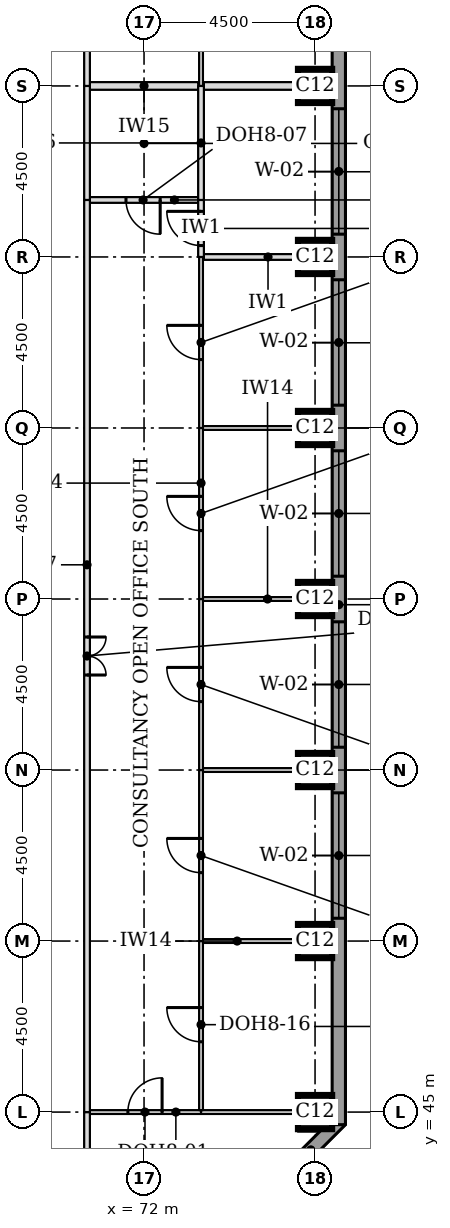
"""IFC4 building model, lengths in metres.
Left out: names, types, materials, properties, quantities, classifications, styles, units other than length and angle.
Written with IfcOpenShell. Run it as: python <this file> out.ifc"""

import sys

from ifc_helpers import new_model, si_unit, direction, frame, frame_2d, origin, origin_2d, place, context, subcontext, project, spatial, rectangle, extrude, element, fill, save


model = new_model("IFC4")
c1 = context("Model", 3, precision=1e-05, world=origin(), true_north=direction((0.0, 1.0)))
c2 = subcontext(c1, "Body", "Model", "MODEL_VIEW")
j1 = project(units=[si_unit("LENGTHUNIT", "METRE"), si_unit("PLANEANGLEUNIT", "RADIAN")], contexts=[c1])
p1 = place(None, origin())
s1 = spatial("IfcSite", under=j1, at=p1, CompositionType="ELEMENT")
p2 = place(p1, origin())
s2 = spatial("IfcBuilding", under=s1, at=p2, CompositionType="ELEMENT")
p3 = place(p2, frame((0.0, 0.0, 199.5)))
s3 = spatial("IfcBuildingStorey", under=s2, at=p3, CompositionType="ELEMENT", Elevation=199.5)
for number, where, z_axis, x_axis in (
    (1, (76.5, 45.0, 0.0), (0.0, 0.0, 1.0), (1.0, 0.0, 0.0)),
    (2, (76.5, 49.5, 0.0), (0.0, 0.0, 1.0), (1.0, 0.0, 0.0)),
    (3, (76.5, 54.0, 0.0), (0.0, 0.0, 1.0), (1.0, 0.0, 0.0)),
    (4, (76.5, 58.5, 0.0), (0.0, 0.0, 1.0), (1.0, 0.0, 0.0)),
    (5, (76.5, 63.0, 0.0), (0.0, 0.0, 1.0), (1.0, 0.0, 0.0)),
    (6, (76.5, 67.5, 0.0), (0.0, 0.0, 1.0), (1.0, 0.0, 0.0)),
    (7, (76.5, 72.0, 0.0), (0.0, 0.0, 1.0), (1.0, 0.0, 0.0)),
):
    element("IfcColumn", number, at=place(p3, frame(where, z_axis=z_axis, x_axis=x_axis)), inside=s3, PredefinedType="COLUMN", context=c2, shape_type="SweptSolid", body=[
        extrude(rectangle(XDim=0.9, YDim=0.9, at=origin_2d()), origin(), (0.0, 0.0, 1.0), 3.7),
    ])
p4 = place(p3, frame((72.208, 39.824, 0.0), z_axis=(0.0, 0.0, 1.0), x_axis=(0.707106781187, 0.707106781187, 0.0)))
e8 = element("IfcWall", 8, at=p4, inside=s3, PredefinedType="STANDARD", context=c2, shape_type="SweptSolid", body=[
    extrude(rectangle(XDim=7.027, YDim=0.35, at=frame_2d((3.513, 0.0))), origin(), (0.0, 0.0, 1.0), 3.525),
])
p5 = place(p4, frame((1.863, 0.0, 0.9)))
e9 = element("IfcOpeningElement", 9, at=p5, cuts=e8, PredefinedType="OPENING", context=c2, shape_type="SweptSolid", body=[
    extrude(rectangle(XDim=3.3, YDim=1.9, at=frame_2d((1.65, 0.95))), frame((0.0, 0.185, 0.0), z_axis=(0.0, -1.0, 0.0), x_axis=(1.0, 0.0, 0.0)), (0.0, 0.0, 1.0), 0.37),
])
p6 = place(p3, frame((77.125, 44.669, 0.0), z_axis=(0.0, 0.0, 1.0), x_axis=(0.0, 1.0, 0.0)))
e10 = element("IfcWall", 10, at=p6, inside=s3, PredefinedType="STANDARD", context=c2, shape_type="SweptSolid", body=[
    extrude(rectangle(XDim=32.163, YDim=0.35, at=frame_2d((16.081, 0.0))), origin(), (0.0, 0.0, 1.0), 3.525),
])
p7 = place(p6, frame((5.431, 0.0, 0.9)))
e11 = element("IfcOpeningElement", 11, at=p7, cuts=e10, PredefinedType="OPENING", context=c2, shape_type="SweptSolid", body=[
    extrude(rectangle(XDim=3.3, YDim=1.9, at=frame_2d((1.65, 0.95))), frame((0.0, 0.185, 0.0), z_axis=(0.0, -1.0, 0.0), x_axis=(1.0, 0.0, 0.0)), (0.0, 0.0, 1.0), 0.37),
])
p8 = place(p6, frame((9.931, 0.0, 0.9)))
e12 = element("IfcOpeningElement", 12, at=p8, cuts=e10, PredefinedType="OPENING", context=c2, shape_type="SweptSolid", body=[
    extrude(rectangle(XDim=3.3, YDim=1.9, at=frame_2d((1.65, 0.95))), frame((0.0, 0.185, 0.0), z_axis=(0.0, -1.0, 0.0), x_axis=(1.0, 0.0, 0.0)), (0.0, 0.0, 1.0), 0.37),
])
p9 = place(p6, frame((14.431, 0.0, 0.9)))
e13 = element("IfcOpeningElement", 13, at=p9, cuts=e10, PredefinedType="OPENING", context=c2, shape_type="SweptSolid", body=[
    extrude(rectangle(XDim=3.3, YDim=1.9, at=frame_2d((1.65, 0.95))), frame((0.0, 0.185, 0.0), z_axis=(0.0, -1.0, 0.0), x_axis=(1.0, 0.0, 0.0)), (0.0, 0.0, 1.0), 0.37),
])
p10 = place(p6, frame((18.931, 0.0, 0.9)))
e14 = element("IfcOpeningElement", 14, at=p10, cuts=e10, PredefinedType="OPENING", context=c2, shape_type="SweptSolid", body=[
    extrude(rectangle(XDim=3.3, YDim=1.9, at=frame_2d((1.65, 0.95))), frame((0.0, 0.185, 0.0), z_axis=(0.0, -1.0, 0.0), x_axis=(1.0, 0.0, 0.0)), (0.0, 0.0, 1.0), 0.37),
])
p11 = place(p6, frame((23.431, 0.0, 0.9)))
e15 = element("IfcOpeningElement", 15, at=p11, cuts=e10, PredefinedType="OPENING", context=c2, shape_type="SweptSolid", body=[
    extrude(rectangle(XDim=3.3, YDim=1.9, at=frame_2d((1.65, 0.95))), frame((0.0, 0.185, 0.0), z_axis=(0.0, -1.0, 0.0), x_axis=(1.0, 0.0, 0.0)), (0.0, 0.0, 1.0), 0.37),
])
p12 = place(p3, frame((70.575, 45.0, 0.0), z_axis=(0.0, 0.0, 1.0), x_axis=(1.0, 0.0, 0.0)))
e16 = element("IfcWall", 16, at=p12, inside=s3, PredefinedType="PARTITIONING", context=c2, shape_type="SweptSolid", body=[
    extrude(rectangle(XDim=2.925, YDim=0.1, at=frame_2d((1.462, 0.0))), origin(), (0.0, 0.0, 1.0), 3.096),
])
p13 = place(p12, frame((1.0, 0.0, 0.0)))
e17 = element("IfcOpeningElement", 17, at=p13, cuts=e16, PredefinedType="OPENING", context=c2, shape_type="SweptSolid", body=[
    extrude(rectangle(XDim=0.9, YDim=2.1, at=frame_2d((0.45, 1.05))), frame((0.0, 0.06, 0.0), z_axis=(0.0, -1.0, 0.0), x_axis=(1.0, 0.0, 0.0)), (0.0, 0.0, 1.0), 0.12),
])
p14 = place(p3, frame((73.5, 45.0, 0.0), z_axis=(0.0, 0.0, 1.0), x_axis=(1.0, 0.0, 0.0)))
e18 = element("IfcWall", 18, at=p14, inside=s3, PredefinedType="PARTITIONING", context=c2, shape_type="SweptSolid", body=[
    extrude(rectangle(XDim=2.55, YDim=0.1, at=frame_2d((1.275, 0.0))), origin(), (0.0, 0.0, 1.0), 3.096),
])
for number, where, z_axis, x_axis in (
    (19, (73.55, 49.5, 0.0), (0.0, 0.0, 1.0), (1.0, 0.0, 0.0)),
    (20, (73.55, 54.0, 0.0), (0.0, 0.0, 1.0), (1.0, 0.0, 0.0)),
    (21, (73.55, 58.5, 0.0), (0.0, 0.0, 1.0), (1.0, 0.0, 0.0)),
    (22, (73.55, 63.0, 0.0), (0.0, 0.0, 1.0), (1.0, 0.0, 0.0)),
):
    element("IfcWall", number, at=place(p3, frame(where, z_axis=z_axis, x_axis=x_axis)), inside=s3, PredefinedType="PARTITIONING", context=c2, shape_type="SweptSolid", body=[
        extrude(rectangle(XDim=3.4, YDim=0.1, at=frame_2d((1.7, 0.0))), origin(), (0.0, 0.0, 1.0), 3.55),
    ])
p15 = place(p3, frame((73.575, 67.5, 0.0), z_axis=(0.0, 0.0, 1.0), x_axis=(1.0, 0.0, 0.0)))
e23 = element("IfcWall", 23, at=p15, inside=s3, PredefinedType="PARTITIONING", context=c2, shape_type="SweptSolid", body=[
    extrude(rectangle(XDim=3.375, YDim=0.15, at=frame_2d((1.688, 0.0))), origin(), (0.0, 0.0, 1.0), 3.55),
])
p16 = place(p3, frame((70.575, 69.0, 0.0), z_axis=(0.0, 0.0, 1.0), x_axis=(1.0, 0.0, 0.0)))
e24 = element("IfcWall", 24, at=p16, inside=s3, PredefinedType="PARTITIONING", context=c2, shape_type="SweptSolid", body=[
    extrude(rectangle(XDim=2.85, YDim=0.15, at=frame_2d((1.425, 0.0))), origin(), (0.0, 0.0, 1.0), 3.55),
])
p17 = place(p16, frame((0.95, 0.0, 0.0)))
e25 = element("IfcOpeningElement", 25, at=p17, cuts=e24, PredefinedType="OPENING", context=c2, shape_type="SweptSolid", body=[
    extrude(rectangle(XDim=0.9, YDim=2.1, at=frame_2d((0.45, 1.05))), frame((0.0, 0.085, 0.0), z_axis=(0.0, -1.0, 0.0), x_axis=(1.0, 0.0, 0.0)), (0.0, 0.0, 1.0), 0.17),
])
p18 = place(p3, frame((70.575, 72.0, 0.0), z_axis=(0.0, 0.0, 1.0), x_axis=(1.0, 0.0, 0.0)))
e26 = element("IfcWall", 26, at=p18, inside=s3, PredefinedType="PARTITIONING", context=c2, shape_type="SweptSolid", body=[
    extrude(rectangle(XDim=2.85, YDim=0.2, at=frame_2d((1.425, 0.0))), origin(), (0.0, 0.0, 1.0), 3.55),
])
p19 = place(p3, frame((73.575, 72.0, 0.0), z_axis=(0.0, 0.0, 1.0), x_axis=(1.0, 0.0, 0.0)))
e27 = element("IfcWall", 27, at=p19, inside=s3, PredefinedType="PARTITIONING", context=c2, shape_type="SweptSolid", body=[
    extrude(rectangle(XDim=3.375, YDim=0.2, at=frame_2d((1.688, 0.0))), origin(), (0.0, 0.0, 1.0), 3.55),
])
p20 = place(p3, frame((70.5, 40.05, 0.0), z_axis=(0.0, 0.0, 1.0), x_axis=(0.0, 1.0, 0.0)))
e28 = element("IfcWall", 28, at=p20, inside=s3, PredefinedType="PARTITIONING", context=c2, shape_type="SweptSolid", body=[
    extrude(rectangle(XDim=4.95, YDim=0.15, at=frame_2d((2.475, 0.0))), origin(), (0.0, 0.0, 1.0), 3.55),
])
p21 = place(p3, frame((70.5, 45.0, 0.0), z_axis=(0.0, 0.0, 1.0), x_axis=(0.0, 1.0, 0.0)))
e29 = element("IfcWall", 29, at=p21, inside=s3, PredefinedType="PARTITIONING", context=c2, shape_type="SweptSolid", body=[
    extrude(rectangle(XDim=24.0, YDim=0.15, at=frame_2d((12.0, 0.0))), origin(), (0.0, 0.0, 1.0), 3.55),
])
p22 = place(p21, frame((11.5, 0.0, 0.0)))
e30 = element("IfcOpeningElement", 30, at=p22, cuts=e29, PredefinedType="OPENING", context=c2, shape_type="SweptSolid", body=[
    extrude(rectangle(XDim=1.0, YDim=2.1, at=frame_2d((0.5, 1.05))), frame((0.0, 0.085, 0.0), z_axis=(0.0, -1.0, 0.0), x_axis=(1.0, 0.0, 0.0)), (0.0, 0.0, 1.0), 0.17),
])
p23 = place(p3, frame((73.5, 45.05, 0.0), z_axis=(0.0, 0.0, 1.0), x_axis=(0.0, 1.0, 0.0)))
e31 = element("IfcWall", 31, at=p23, inside=s3, PredefinedType="PARTITIONING", context=c2, shape_type="SweptSolid", body=[
    extrude(rectangle(XDim=4.45, YDim=0.1, at=frame_2d((2.225, 0.0))), origin(), (0.0, 0.0, 1.0), 3.55),
])
p24 = place(p23, frame((1.8, 0.0, 0.0)))
e32 = element("IfcOpeningElement", 32, at=p24, cuts=e31, PredefinedType="OPENING", context=c2, shape_type="SweptSolid", body=[
    extrude(rectangle(XDim=0.9, YDim=2.1, at=frame_2d((0.45, 1.05))), frame((0.0, 0.06, 0.0), z_axis=(0.0, -1.0, 0.0), x_axis=(1.0, 0.0, 0.0)), (0.0, 0.0, 1.0), 0.12),
])
p25 = place(p3, frame((73.5, 49.5, 0.0), z_axis=(0.0, 0.0, 1.0), x_axis=(0.0, 1.0, 0.0)))
e33 = element("IfcWall", 33, at=p25, inside=s3, PredefinedType="PARTITIONING", context=c2, shape_type="SweptSolid", body=[
    extrude(rectangle(XDim=4.5, YDim=0.1, at=frame_2d((2.25, 0.0))), origin(), (0.0, 0.0, 1.0), 3.55),
])
p26 = place(p25, frame((1.8, 0.0, 0.0)))
e34 = element("IfcOpeningElement", 34, at=p26, cuts=e33, PredefinedType="OPENING", context=c2, shape_type="SweptSolid", body=[
    extrude(rectangle(XDim=0.9, YDim=2.1, at=frame_2d((0.45, 1.05))), frame((0.0, 0.06, 0.0), z_axis=(0.0, -1.0, 0.0), x_axis=(1.0, 0.0, 0.0)), (0.0, 0.0, 1.0), 0.12),
])
p27 = place(p3, frame((73.5, 54.0, 0.0), z_axis=(0.0, 0.0, 1.0), x_axis=(0.0, 1.0, 0.0)))
e35 = element("IfcWall", 35, at=p27, inside=s3, PredefinedType="PARTITIONING", context=c2, shape_type="SweptSolid", body=[
    extrude(rectangle(XDim=4.5, YDim=0.1, at=frame_2d((2.25, 0.0))), origin(), (0.0, 0.0, 1.0), 3.55),
])
p28 = place(p27, frame((1.8, 0.0, 0.0)))
e36 = element("IfcOpeningElement", 36, at=p28, cuts=e35, PredefinedType="OPENING", context=c2, shape_type="SweptSolid", body=[
    extrude(rectangle(XDim=0.9, YDim=2.1, at=frame_2d((0.45, 1.05))), frame((0.0, 0.06, 0.0), z_axis=(0.0, -1.0, 0.0), x_axis=(1.0, 0.0, 0.0)), (0.0, 0.0, 1.0), 0.12),
])
p29 = place(p3, frame((73.5, 58.5, 0.0), z_axis=(0.0, 0.0, 1.0), x_axis=(0.0, 1.0, 0.0)))
e37 = element("IfcWall", 37, at=p29, inside=s3, PredefinedType="PARTITIONING", context=c2, shape_type="SweptSolid", body=[
    extrude(rectangle(XDim=4.5, YDim=0.1, at=frame_2d((2.25, 0.0))), origin(), (0.0, 0.0, 1.0), 3.55),
])
p30 = place(p29, frame((1.8, 0.0, 0.0)))
e38 = element("IfcOpeningElement", 38, at=p30, cuts=e37, PredefinedType="OPENING", context=c2, shape_type="SweptSolid", body=[
    extrude(rectangle(XDim=0.9, YDim=2.1, at=frame_2d((0.45, 1.05))), frame((0.0, 0.06, 0.0), z_axis=(0.0, -1.0, 0.0), x_axis=(1.0, 0.0, 0.0)), (0.0, 0.0, 1.0), 0.12),
])
p31 = place(p3, frame((73.5, 63.0, 0.0), z_axis=(0.0, 0.0, 1.0), x_axis=(0.0, 1.0, 0.0)))
e39 = element("IfcWall", 39, at=p31, inside=s3, PredefinedType="PARTITIONING", context=c2, shape_type="SweptSolid", body=[
    extrude(rectangle(XDim=4.5, YDim=0.1, at=frame_2d((2.25, 0.0))), origin(), (0.0, 0.0, 1.0), 3.55),
])
p32 = place(p31, frame((1.8, 0.0, 0.0)))
e40 = element("IfcOpeningElement", 40, at=p32, cuts=e39, PredefinedType="OPENING", context=c2, shape_type="SweptSolid", body=[
    extrude(rectangle(XDim=0.9, YDim=2.1, at=frame_2d((0.45, 1.05))), frame((0.0, 0.06, 0.0), z_axis=(0.0, -1.0, 0.0), x_axis=(1.0, 0.0, 0.0)), (0.0, 0.0, 1.0), 0.12),
])
p33 = place(p3, frame((73.5, 67.5, 0.0), z_axis=(0.0, 0.0, 1.0), x_axis=(0.0, 1.0, 0.0)))
e41 = element("IfcWall", 41, at=p33, inside=s3, PredefinedType="PARTITIONING", context=c2, shape_type="SweptSolid", body=[
    extrude(rectangle(XDim=1.5, YDim=0.15, at=frame_2d((0.75, 0.0))), origin(), (0.0, 0.0, 1.0), 3.55),
])
p34 = place(p33, frame((0.3, 0.0, 0.0)))
e42 = element("IfcOpeningElement", 42, at=p34, cuts=e41, PredefinedType="OPENING", context=c2, shape_type="SweptSolid", body=[
    extrude(rectangle(XDim=0.9, YDim=2.1, at=frame_2d((0.45, 1.05))), frame((0.0, 0.085, 0.0), z_axis=(0.0, -1.0, 0.0), x_axis=(1.0, 0.0, 0.0)), (0.0, 0.0, 1.0), 0.17),
])
for number, where, z_axis, x_axis in (
    (43, (70.5, 69.0, 0.0), (0.0, 0.0, 1.0), (0.0, 1.0, 0.0)),
    (44, (73.5, 69.0, 0.0), (0.0, 0.0, 1.0), (0.0, 1.0, 0.0)),
):
    element("IfcWall", number, at=place(p3, frame(where, z_axis=z_axis, x_axis=x_axis)), inside=s3, PredefinedType="PARTITIONING", context=c2, shape_type="SweptSolid", body=[
        extrude(rectangle(XDim=3.0, YDim=0.15, at=frame_2d((1.5, 0.0))), origin(), (0.0, 0.0, 1.0), 3.55),
    ])
p35 = place(p3, frame((70.5, 72.0, 0.0), z_axis=(0.0, 0.0, 1.0), x_axis=(0.0, 1.0, 0.0)))
e45 = element("IfcWall", 45, at=p35, inside=s3, PredefinedType="PARTITIONING", context=c2, shape_type="SweptSolid", body=[
    extrude(rectangle(XDim=4.5, YDim=0.15, at=frame_2d((2.25, 0.0))), origin(), (0.0, 0.0, 1.0), 3.55),
])
p36 = place(p35, frame((1.75, 0.0, 0.0)))
e46 = element("IfcOpeningElement", 46, at=p36, cuts=e45, PredefinedType="OPENING", context=c2, shape_type="SweptSolid", body=[
    extrude(rectangle(XDim=1.0, YDim=2.1, at=frame_2d((0.5, 1.05))), frame((0.0, 0.085, 0.0), z_axis=(0.0, -1.0, 0.0), x_axis=(1.0, 0.0, 0.0)), (0.0, 0.0, 1.0), 0.17),
])
p37 = place(p3, frame((73.5, 72.0, 0.0), z_axis=(0.0, 0.0, 1.0), x_axis=(0.0, 1.0, 0.0)))
e47 = element("IfcWall", 47, at=p37, inside=s3, PredefinedType="PARTITIONING", context=c2, shape_type="SweptSolid", body=[
    extrude(rectangle(XDim=4.425, YDim=0.1, at=frame_2d((2.212, 0.0))), origin(), (0.0, 0.0, 1.0), 3.55),
])
p38 = place(p37, frame((1.75, 0.0, 0.0)))
e48 = element("IfcOpeningElement", 48, at=p38, cuts=e47, PredefinedType="OPENING", context=c2, shape_type="SweptSolid", body=[
    extrude(rectangle(XDim=0.9, YDim=2.1, at=frame_2d((0.45, 1.05))), frame((0.0, 0.06, 0.0), z_axis=(0.0, -1.0, 0.0), x_axis=(1.0, 0.0, 0.0)), (0.0, 0.0, 1.0), 0.12),
])
p39 = place(p7, origin())
e49 = element("IfcWindow", 49, at=p39, inside=s3, PartitioningType="SINGLE_PANEL", PredefinedType="WINDOW", context=c2, shape_type="SweptSolid", body=[
    extrude(rectangle(XDim=3.3, YDim=1.9, at=frame_2d((1.65, 0.95))), frame((0.0, 0.085, 0.0), z_axis=(0.0, -1.0, 0.0), x_axis=(1.0, 0.0, 0.0)), (0.0, 0.0, 1.0), 0.06),
])
fill(e11, e49)
p40 = place(p8, origin())
e50 = element("IfcWindow", 50, at=p40, inside=s3, PartitioningType="SINGLE_PANEL", PredefinedType="WINDOW", context=c2, shape_type="SweptSolid", body=[
    extrude(rectangle(XDim=3.3, YDim=1.9, at=frame_2d((1.65, 0.95))), frame((0.0, 0.085, 0.0), z_axis=(0.0, -1.0, 0.0), x_axis=(1.0, 0.0, 0.0)), (0.0, 0.0, 1.0), 0.06),
])
fill(e12, e50)
p41 = place(p9, origin())
e51 = element("IfcWindow", 51, at=p41, inside=s3, PartitioningType="SINGLE_PANEL", PredefinedType="WINDOW", context=c2, shape_type="SweptSolid", body=[
    extrude(rectangle(XDim=3.3, YDim=1.9, at=frame_2d((1.65, 0.95))), frame((0.0, 0.085, 0.0), z_axis=(0.0, -1.0, 0.0), x_axis=(1.0, 0.0, 0.0)), (0.0, 0.0, 1.0), 0.06),
])
fill(e13, e51)
p42 = place(p10, origin())
e52 = element("IfcWindow", 52, at=p42, inside=s3, PartitioningType="SINGLE_PANEL", PredefinedType="WINDOW", context=c2, shape_type="SweptSolid", body=[
    extrude(rectangle(XDim=3.3, YDim=1.9, at=frame_2d((1.65, 0.95))), frame((0.0, 0.085, 0.0), z_axis=(0.0, -1.0, 0.0), x_axis=(1.0, 0.0, 0.0)), (0.0, 0.0, 1.0), 0.06),
])
fill(e14, e52)
p43 = place(p11, origin())
e53 = element("IfcWindow", 53, at=p43, inside=s3, PartitioningType="SINGLE_PANEL", PredefinedType="WINDOW", context=c2, shape_type="SweptSolid", body=[
    extrude(rectangle(XDim=3.3, YDim=1.9, at=frame_2d((1.65, 0.95))), frame((0.0, 0.085, 0.0), z_axis=(0.0, -1.0, 0.0), x_axis=(1.0, 0.0, 0.0)), (0.0, 0.0, 1.0), 0.06),
])
fill(e15, e53)
p44 = place(p22, frame((1.0, 0.0, 0.0), z_axis=(0.0, 0.0, 1.0), x_axis=(-1.0, 0.0, 0.0)))
e54 = element("IfcDoor", 54, at=p44, inside=s3, OperationType="DOUBLE_DOOR_SINGLE_SWING", PredefinedType="DOOR", context=c2, shape_type="SweptSolid", body=[
    extrude(rectangle(XDim=1.0, YDim=2.1, at=frame_2d((0.5, 1.05))), frame((0.0, 0.025, 0.0), z_axis=(0.0, -1.0, 0.0), x_axis=(1.0, 0.0, 0.0)), (0.0, 0.0, 1.0), 0.05),
])
fill(e30, e54)
p45 = place(p13, origin())
e55 = element("IfcDoor", 55, at=p45, inside=s3, OperationType="SINGLE_SWING_RIGHT", PredefinedType="DOOR", context=c2, shape_type="SweptSolid", body=[
    extrude(rectangle(XDim=0.9, YDim=2.1, at=frame_2d((0.45, 1.05))), frame((0.0, 0.025, 0.0), z_axis=(0.0, -1.0, 0.0), x_axis=(1.0, 0.0, 0.0)), (0.0, 0.0, 1.0), 0.05),
])
fill(e17, e55)
p46 = place(p24, origin())
e56 = element("IfcDoor", 56, at=p46, inside=s3, OperationType="SINGLE_SWING_RIGHT", PredefinedType="DOOR", context=c2, shape_type="SweptSolid", body=[
    extrude(rectangle(XDim=0.9, YDim=2.1, at=frame_2d((0.45, 1.05))), frame((0.0, 0.025, 0.0), z_axis=(0.0, -1.0, 0.0), x_axis=(1.0, 0.0, 0.0)), (0.0, 0.0, 1.0), 0.05),
])
fill(e32, e56)
p47 = place(p26, origin())
e57 = element("IfcDoor", 57, at=p47, inside=s3, OperationType="SINGLE_SWING_RIGHT", PredefinedType="DOOR", context=c2, shape_type="SweptSolid", body=[
    extrude(rectangle(XDim=0.9, YDim=2.1, at=frame_2d((0.45, 1.05))), frame((0.0, 0.025, 0.0), z_axis=(0.0, -1.0, 0.0), x_axis=(1.0, 0.0, 0.0)), (0.0, 0.0, 1.0), 0.05),
])
fill(e34, e57)
p48 = place(p28, origin())
e58 = element("IfcDoor", 58, at=p48, inside=s3, OperationType="SINGLE_SWING_RIGHT", PredefinedType="DOOR", context=c2, shape_type="SweptSolid", body=[
    extrude(rectangle(XDim=0.9, YDim=2.1, at=frame_2d((0.45, 1.05))), frame((0.0, 0.025, 0.0), z_axis=(0.0, -1.0, 0.0), x_axis=(1.0, 0.0, 0.0)), (0.0, 0.0, 1.0), 0.05),
])
fill(e36, e58)
p49 = place(p30, origin())
e59 = element("IfcDoor", 59, at=p49, inside=s3, OperationType="SINGLE_SWING_RIGHT", PredefinedType="DOOR", context=c2, shape_type="SweptSolid", body=[
    extrude(rectangle(XDim=0.9, YDim=2.1, at=frame_2d((0.45, 1.05))), frame((0.0, 0.025, 0.0), z_axis=(0.0, -1.0, 0.0), x_axis=(1.0, 0.0, 0.0)), (0.0, 0.0, 1.0), 0.05),
])
fill(e38, e59)
p50 = place(p32, origin())
e60 = element("IfcDoor", 60, at=p50, inside=s3, OperationType="SINGLE_SWING_RIGHT", PredefinedType="DOOR", context=c2, shape_type="SweptSolid", body=[
    extrude(rectangle(XDim=0.9, YDim=2.1, at=frame_2d((0.45, 1.05))), frame((0.0, 0.025, 0.0), z_axis=(0.0, -1.0, 0.0), x_axis=(1.0, 0.0, 0.0)), (0.0, 0.0, 1.0), 0.05),
])
fill(e40, e60)
p51 = place(p17, frame((0.9, 0.0, 0.0), z_axis=(0.0, 0.0, 1.0), x_axis=(-1.0, 0.0, 0.0)))
e61 = element("IfcDoor", 61, at=p51, inside=s3, OperationType="SINGLE_SWING_LEFT", PredefinedType="DOOR", context=c2, shape_type="SweptSolid", body=[
    extrude(rectangle(XDim=0.9, YDim=2.1, at=frame_2d((0.45, 1.05))), frame((0.0, 0.025, 0.0), z_axis=(0.0, -1.0, 0.0), x_axis=(1.0, 0.0, 0.0)), (0.0, 0.0, 1.0), 0.05),
])
fill(e25, e61)
p52 = place(p34, origin())
e62 = element("IfcDoor", 62, at=p52, inside=s3, OperationType="SINGLE_SWING_RIGHT", PredefinedType="DOOR", context=c2, shape_type="SweptSolid", body=[
    extrude(rectangle(XDim=0.9, YDim=2.1, at=frame_2d((0.45, 1.05))), frame((0.0, 0.025, 0.0), z_axis=(0.0, -1.0, 0.0), x_axis=(1.0, 0.0, 0.0)), (0.0, 0.0, 1.0), 0.05),
])
fill(e42, e62)
save(model, sys.argv[1])
